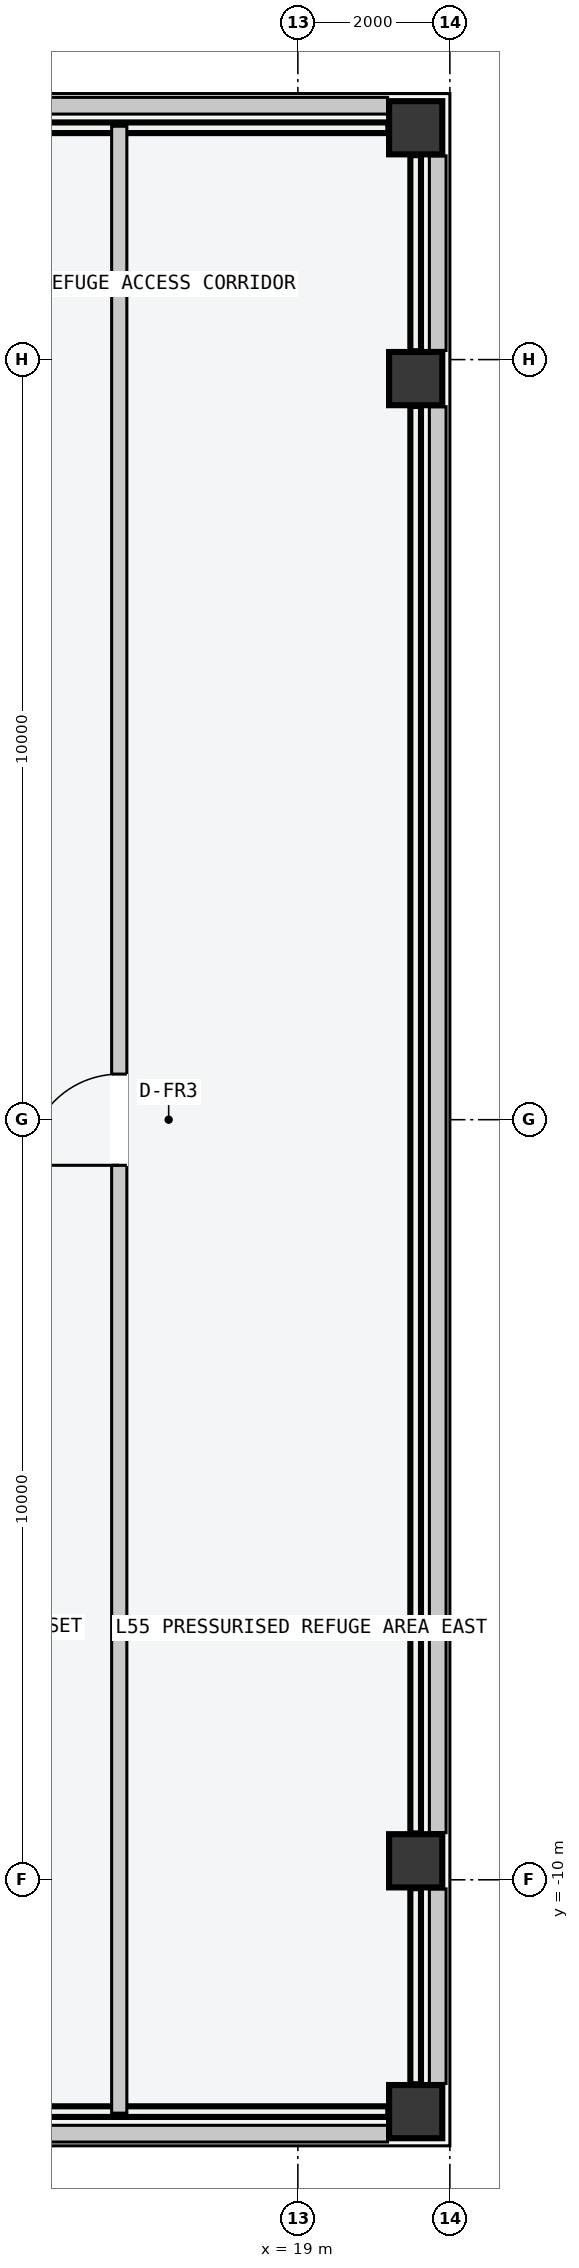
"""IFC4 building model, lengths in metres.
Left out: names, types, materials, properties, quantities, classifications, styles, units other than length and angle.
Written with IfcOpenShell. Run it as: python <this file> out.ifc"""

import sys

from ifc_helpers import new_model, si_unit, direction, frame, frame_2d, origin, origin_2d, place, context, subcontext, project, spatial, rectangle, hollow_rectangle, extrude, element, fill, save


model = new_model("IFC4")
c1 = context("Model", 3, precision=1e-05, world=origin(), true_north=direction((0.0, 1.0)))
c2 = subcontext(c1, "Body", "Model", "MODEL_VIEW")
j1 = project(units=[si_unit("LENGTHUNIT", "METRE"), si_unit("PLANEANGLEUNIT", "RADIAN")], contexts=[c1])
p1 = place(None, origin())
s1 = spatial("IfcSite", under=j1, at=p1, CompositionType="ELEMENT")
p2 = place(p1, origin())
s2 = spatial("IfcBuilding", under=s1, at=p2, CompositionType="ELEMENT")
p3 = place(p2, frame((0.0, 0.0, 209.1)))
s3 = spatial("IfcBuildingStorey", under=s2, at=p3, CompositionType="ELEMENT", Elevation=209.1)
for number, where, z_axis, x_axis in (
    (1, (20.55, -13.05, 0.0), (0.0, 0.0, 1.0), (0.0, 1.0, 0.0)),
    (2, (20.55, -9.75, 0.0), (0.0, 0.0, 1.0), (0.0, 1.0, 0.0)),
    (3, (20.55, 9.75, 0.0), (0.0, 0.0, 1.0), (0.0, 1.0, 0.0)),
    (4, (20.55, 13.05, 0.0), (0.0, 0.0, 1.0), (0.0, 1.0, 0.0)),
):
    element("IfcColumn", number, at=place(p3, frame(where, z_axis=z_axis, x_axis=x_axis)), inside=s3, PredefinedType="COLUMN", context=c2, shape_type="SweptSolid", body=[
        extrude(hollow_rectangle(XDim=0.7, YDim=0.7, WallThickness=0.03, at=origin_2d()), origin(), (0.0, 0.0, 1.0), 4.8),
    ])
p4 = place(p3, frame((20.84, -12.68, 0.0), z_axis=(0.0, 0.0, 1.0), x_axis=(0.0, 1.0, 0.0)))
e5 = element("IfcWall", 5, at=p4, inside=s3, PredefinedType="PARAPET", context=c2, shape_type="SweptSolid", body=[
    extrude(rectangle(XDim=2.56, YDim=0.22, at=frame_2d((1.28, 0.0))), origin(), (0.0, 0.0, 1.0), 1.2),
])
p5 = place(p3, frame((20.84, -9.38, 0.0), z_axis=(0.0, 0.0, 1.0), x_axis=(0.0, 1.0, 0.0)))
e6 = element("IfcWall", 6, at=p5, inside=s3, PredefinedType="PARAPET", context=c2, shape_type="SweptSolid", body=[
    extrude(rectangle(XDim=18.76, YDim=0.22, at=frame_2d((9.38, 0.0))), origin(), (0.0, 0.0, 1.0), 1.2),
])
p6 = place(p3, frame((20.84, 10.12, 0.0), z_axis=(0.0, 0.0, 1.0), x_axis=(0.0, 1.0, 0.0)))
e7 = element("IfcWall", 7, at=p6, inside=s3, PredefinedType="PARAPET", context=c2, shape_type="SweptSolid", body=[
    extrude(rectangle(XDim=2.56, YDim=0.22, at=frame_2d((1.28, 0.0))), origin(), (0.0, 0.0, 1.0), 1.2),
])
for number, where, z_axis, x_axis in (
    (8, (15.46, -13.34, 0.0), (0.0, 0.0, 1.0), (1.0, 0.0, 0.0)),
    (9, (15.46, 13.34, 0.0), (0.0, 0.0, 1.0), (1.0, 0.0, 0.0)),
):
    element("IfcWall", number, at=place(p3, frame(where, z_axis=z_axis, x_axis=x_axis)), inside=s3, PredefinedType="PARAPET", context=c2, shape_type="SweptSolid", body=[
        extrude(rectangle(XDim=4.72, YDim=0.22, at=frame_2d((2.36, 0.0))), origin(), (0.0, 0.0, 1.0), 1.2),
    ])
p7 = place(p3, frame((16.65, -13.07, 0.0), z_axis=(0.0, 0.0, 1.0), x_axis=(0.0, 1.0, 0.0)))
e10 = element("IfcWall", 10, at=p7, inside=s3, PredefinedType="PARTITIONING", context=c2, shape_type="SweptSolid", body=[
    extrude(rectangle(XDim=26.14, YDim=0.2, at=frame_2d((13.07, 0.0))), origin(), (0.0, 0.0, 1.0), 4.6),
])
p8 = place(p7, frame((12.47, 0.0, 0.0)))
e11 = element("IfcOpeningElement", 11, at=p8, cuts=e10, PredefinedType="OPENING", context=c2, shape_type="SweptSolid", body=[
    extrude(rectangle(XDim=1.2, YDim=2.22, at=frame_2d((0.6, 1.11))), frame((0.0, 0.11, 0.0), z_axis=(0.0, -1.0, 0.0), x_axis=(1.0, 0.0, 0.0)), (0.0, 0.0, 1.0), 0.22),
])
p9 = place(p8, origin())
e12 = element("IfcDoor", 12, at=p9, inside=s3, OperationType="SINGLE_SWING_LEFT", PredefinedType="DOOR", context=c2, shape_type="SweptSolid", body=[
    extrude(rectangle(XDim=1.2, YDim=2.22, at=frame_2d((0.6, 1.11))), frame((0.0, 0.025, 0.0), z_axis=(0.0, -1.0, 0.0), x_axis=(1.0, 0.0, 0.0)), (0.0, 0.0, 1.0), 0.05),
])
fill(e11, e12)
save(model, sys.argv[1])
